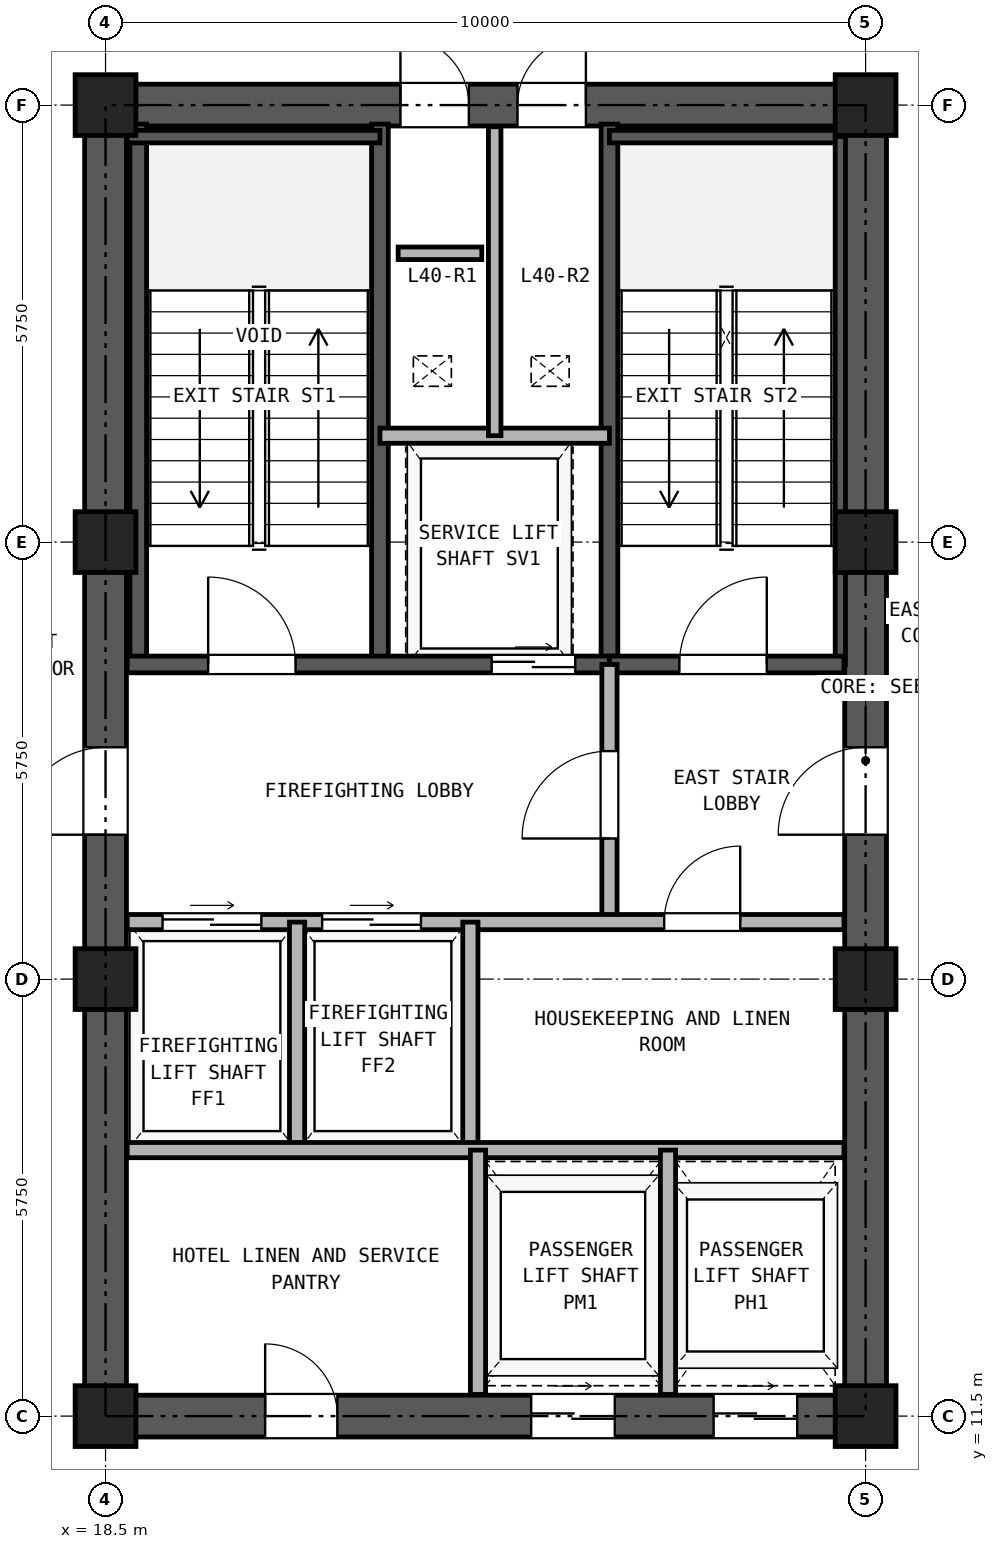
"""IFC4 building model, lengths in metres.
Left out: names, types, materials, properties, quantities, classifications, styles, units other than length and angle.
Written with IfcOpenShell. Run it as: python <this file> out.ifc"""

import sys

from ifc_helpers import new_model, si_unit, direction, frame, frame_2d, origin, origin_2d, place, context, subcontext, project, spatial, rectangle, hollow_rectangle, extrude, source, transform, mapped, element, fill, save


model = new_model("IFC4")
c1 = context("Model", 3, precision=1e-05, world=origin(), true_north=direction((0.0, 1.0)))
c2 = subcontext(c1, "Body", "Model", "MODEL_VIEW")
j1 = project(units=[si_unit("LENGTHUNIT", "METRE"), si_unit("PLANEANGLEUNIT", "RADIAN")], contexts=[c1])
p1 = place(None, origin())
s1 = spatial("IfcSite", under=j1, at=p1, CompositionType="ELEMENT")
p2 = place(p1, origin())
s2 = spatial("IfcBuilding", under=s1, at=p2, CompositionType="ELEMENT")
p3 = place(p2, frame((0.0, 0.0, 143.9)))
s3 = spatial("IfcBuildingStorey", under=s2, at=p3, CompositionType="ELEMENT", Elevation=143.9)
m1 = source(origin(), c2, "Body", "SweptSolid", [
    extrude(hollow_rectangle(XDim=0.8, YDim=0.8, WallThickness=0.045, at=origin_2d()), origin(), (0.0, 0.0, 1.0), 4.25),
])
for number, where, z_axis, x_axis in (
    (1, (18.5, 11.5, 0.0), (0.0, 0.0, 1.0), (1.0, 0.0, 0.0)),
    (2, (18.5, 17.25, 0.0), (0.0, 0.0, 1.0), (1.0, 0.0, 0.0)),
    (3, (18.5, 23.0, 0.0), (0.0, 0.0, 1.0), (1.0, 0.0, 0.0)),
    (4, (18.5, 28.75, 0.0), (0.0, 0.0, 1.0), (1.0, 0.0, 0.0)),
    (5, (28.5, 11.5, 0.0), (0.0, 0.0, 1.0), (1.0, 0.0, 0.0)),
    (6, (28.5, 17.25, 0.0), (0.0, 0.0, 1.0), (1.0, 0.0, 0.0)),
    (7, (28.5, 23.0, 0.0), (0.0, 0.0, 1.0), (1.0, 0.0, 0.0)),
    (8, (28.5, 28.75, 0.0), (0.0, 0.0, 1.0), (1.0, 0.0, 0.0)),
):
    element("IfcColumn", number, at=place(p3, frame(where, z_axis=z_axis, x_axis=x_axis)), inside=s3, PredefinedType="COLUMN", context=c2, shape_type="MappedRepresentation", body=[
        mapped(m1, transform((0.0, 0.0, 0.0), x_axis=(1.0, 0.0, 0.0), y_axis=(0.0, 1.0, 0.0), z_axis=(0.0, 0.0, 1.0), scale=1.0)),
    ])
p4 = place(p3, frame((18.225, 11.5, 0.0), z_axis=(0.0, 0.0, 1.0), x_axis=(1.0, 0.0, 0.0)))
e9 = element("IfcWall", 9, at=p4, inside=s3, PredefinedType="SHEAR", context=c2, shape_type="SweptSolid", body=[
    extrude(rectangle(XDim=10.55, YDim=0.55, at=frame_2d((5.275, 0.0))), origin(), (0.0, 0.0, 1.0), 4.25),
])
p5 = place(p4, frame((2.375, 0.0, 0.0)))
e10 = element("IfcOpeningElement", 10, at=p5, cuts=e9, PredefinedType="OPENING", context=c2, shape_type="SweptSolid", body=[
    extrude(rectangle(XDim=0.95, YDim=2.15, at=frame_2d((0.475, 1.075))), frame((0.0, 0.285, 0.0), z_axis=(0.0, -1.0, 0.0), x_axis=(1.0, 0.0, 0.0)), (0.0, 0.0, 1.0), 0.57),
])
p6 = place(p4, frame((5.875, 0.0, 0.0)))
e11 = element("IfcOpeningElement", 11, at=p6, cuts=e9, PredefinedType="OPENING", context=c2, shape_type="SweptSolid", body=[
    extrude(rectangle(XDim=1.1, YDim=2.25, at=frame_2d((0.55, 1.125))), frame((0.0, 0.285, 0.0), z_axis=(0.0, -1.0, 0.0), x_axis=(1.0, 0.0, 0.0)), (0.0, 0.0, 1.0), 0.57),
])
p7 = place(p4, frame((8.275, 0.0, 0.0)))
e12 = element("IfcOpeningElement", 12, at=p7, cuts=e9, PredefinedType="OPENING", context=c2, shape_type="SweptSolid", body=[
    extrude(rectangle(XDim=1.1, YDim=2.25, at=frame_2d((0.55, 1.125))), frame((0.0, 0.285, 0.0), z_axis=(0.0, -1.0, 0.0), x_axis=(1.0, 0.0, 0.0)), (0.0, 0.0, 1.0), 0.57),
])
p8 = place(p3, frame((18.225, 28.75, 0.0), z_axis=(0.0, 0.0, 1.0), x_axis=(1.0, 0.0, 0.0)))
e13 = element("IfcWall", 13, at=p8, inside=s3, PredefinedType="SHEAR", context=c2, shape_type="SweptSolid", body=[
    extrude(rectangle(XDim=10.55, YDim=0.55, at=frame_2d((5.275, 0.0))), origin(), (0.0, 0.0, 1.0), 4.25),
])
p9 = place(p8, frame((4.155, 0.0, 0.0)))
e14 = element("IfcOpeningElement", 14, at=p9, cuts=e13, PredefinedType="OPENING", context=c2, shape_type="SweptSolid", body=[
    extrude(rectangle(XDim=0.9, YDim=2.05, at=frame_2d((0.45, 1.025))), frame((0.0, 0.285, 0.0), z_axis=(0.0, -1.0, 0.0), x_axis=(1.0, 0.0, 0.0)), (0.0, 0.0, 1.0), 0.57),
])
p10 = place(p8, frame((5.695, 0.0, 0.0)))
e15 = element("IfcOpeningElement", 15, at=p10, cuts=e13, PredefinedType="OPENING", context=c2, shape_type="SweptSolid", body=[
    extrude(rectangle(XDim=0.9, YDim=2.05, at=frame_2d((0.45, 1.025))), frame((0.0, 0.285, 0.0), z_axis=(0.0, -1.0, 0.0), x_axis=(1.0, 0.0, 0.0)), (0.0, 0.0, 1.0), 0.57),
])
p11 = place(p3, frame((18.5, 11.775, 0.0), z_axis=(0.0, 0.0, 1.0), x_axis=(0.0, 1.0, 0.0)))
e16 = element("IfcWall", 16, at=p11, inside=s3, PredefinedType="SHEAR", context=c2, shape_type="SweptSolid", body=[
    extrude(rectangle(XDim=16.7, YDim=0.55, at=frame_2d((8.35, 0.0))), origin(), (0.0, 0.0, 1.0), 4.25),
])
p12 = place(p11, frame((7.375, 0.0, 0.0)))
e17 = element("IfcOpeningElement", 17, at=p12, cuts=e16, PredefinedType="OPENING", context=c2, shape_type="SweptSolid", body=[
    extrude(rectangle(XDim=1.15, YDim=2.2, at=frame_2d((0.575, 1.1))), frame((0.0, 0.285, 0.0), z_axis=(0.0, -1.0, 0.0), x_axis=(1.0, 0.0, 0.0)), (0.0, 0.0, 1.0), 0.57),
])
p13 = place(p3, frame((28.5, 11.775, 0.0), z_axis=(0.0, 0.0, 1.0), x_axis=(0.0, 1.0, 0.0)))
e18 = element("IfcWall", 18, at=p13, inside=s3, PredefinedType="SHEAR", context=c2, shape_type="SweptSolid", body=[
    extrude(rectangle(XDim=16.7, YDim=0.55, at=frame_2d((8.35, 0.0))), origin(), (0.0, 0.0, 1.0), 4.25),
])
p14 = place(p13, frame((7.375, 0.0, 0.0)))
e19 = element("IfcOpeningElement", 19, at=p14, cuts=e18, PredefinedType="OPENING", context=c2, shape_type="SweptSolid", body=[
    extrude(rectangle(XDim=1.15, YDim=2.2, at=frame_2d((0.575, 1.1))), frame((0.0, 0.285, 0.0), z_axis=(0.0, -1.0, 0.0), x_axis=(1.0, 0.0, 0.0)), (0.0, 0.0, 1.0), 0.57),
])
for number, where, z_axis, x_axis in (
    (20, (18.93, 21.39, 0.0), (0.0, 0.0, 1.0), (0.0, 1.0, 0.0)),
    (21, (22.11, 21.39, 0.0), (0.0, 0.0, 1.0), (0.0, 1.0, 0.0)),
    (22, (25.13, 21.39, 0.0), (0.0, 0.0, 1.0), (0.0, 1.0, 0.0)),
):
    element("IfcWall", number, at=place(p3, frame(where, z_axis=z_axis, x_axis=x_axis)), inside=s3, PredefinedType="SOLIDWALL", context=c2, shape_type="SweptSolid", body=[
        extrude(rectangle(XDim=7.11, YDim=0.22, at=frame_2d((3.555, 0.0))), origin(), (0.0, 0.0, 1.0), 4.25),
    ])
p15 = place(p3, frame((18.785, 28.335, 0.0), z_axis=(0.0, 0.0, 1.0), x_axis=(1.0, 0.0, 0.0)))
e23 = element("IfcWall", 23, at=p15, inside=s3, PredefinedType="PARTITIONING", context=c2, shape_type="SweptSolid", body=[
    extrude(rectangle(XDim=3.325, YDim=0.165, at=frame_2d((1.663, 0.0))), origin(), (0.0, 0.0, 1.0), 4.25),
])
p16 = place(p3, frame((25.13, 28.335, 0.0), z_axis=(0.0, 0.0, 1.0), x_axis=(1.0, 0.0, 0.0)))
e24 = element("IfcWall", 24, at=p16, inside=s3, PredefinedType="PARTITIONING", context=c2, shape_type="SweptSolid", body=[
    extrude(rectangle(XDim=3.085, YDim=0.165, at=frame_2d((1.542, 0.0))), origin(), (0.0, 0.0, 1.0), 4.25),
])
p17 = place(p3, frame((28.167, 21.39, 0.0), z_axis=(0.0, 0.0, 1.0), x_axis=(0.0, 1.0, 0.0)))
e25 = element("IfcWall", 25, at=p17, inside=s3, PredefinedType="PARTITIONING", context=c2, shape_type="SweptSolid", body=[
    extrude(rectangle(XDim=6.945, YDim=0.135, at=frame_2d((3.473, 0.0))), origin(), (0.0, 0.0, 1.0), 4.25),
])
p18 = place(p3, frame((18.785, 21.39, 0.0), z_axis=(0.0, 0.0, 1.0), x_axis=(1.0, 0.0, 0.0)))
e26 = element("IfcWall", 26, at=p18, inside=s3, PredefinedType="SOLIDWALL", context=c2, shape_type="SweptSolid", body=[
    extrude(rectangle(XDim=6.345, YDim=0.22, at=frame_2d((3.172, 0.0))), origin(), (0.0, 0.0, 1.0), 4.25),
])
p19 = place(p18, frame((1.065, 0.0, 0.0)))
e27 = element("IfcOpeningElement", 27, at=p19, cuts=e26, PredefinedType="OPENING", context=c2, shape_type="SweptSolid", body=[
    extrude(rectangle(XDim=1.15, YDim=2.2, at=frame_2d((0.575, 1.1))), frame((0.0, 0.12, 0.0), z_axis=(0.0, -1.0, 0.0), x_axis=(1.0, 0.0, 0.0)), (0.0, 0.0, 1.0), 0.24),
])
p20 = place(p18, frame((4.795, 0.0, 0.0)))
e28 = element("IfcOpeningElement", 28, at=p20, cuts=e26, PredefinedType="OPENING", context=c2, shape_type="SweptSolid", body=[
    extrude(rectangle(XDim=1.1, YDim=2.25, at=frame_2d((0.55, 1.125))), frame((0.0, 0.12, 0.0), z_axis=(0.0, -1.0, 0.0), x_axis=(1.0, 0.0, 0.0)), (0.0, 0.0, 1.0), 0.24),
])
p21 = place(p3, frame((25.13, 21.39, 0.0), z_axis=(0.0, 0.0, 1.0), x_axis=(1.0, 0.0, 0.0)))
e29 = element("IfcWall", 29, at=p21, inside=s3, PredefinedType="SOLIDWALL", context=c2, shape_type="SweptSolid", body=[
    extrude(rectangle(XDim=3.085, YDim=0.22, at=frame_2d((1.542, 0.0))), origin(), (0.0, 0.0, 1.0), 4.25),
])
p22 = place(p21, frame((0.92, 0.0, 0.0)))
e30 = element("IfcOpeningElement", 30, at=p22, cuts=e29, PredefinedType="OPENING", context=c2, shape_type="SweptSolid", body=[
    extrude(rectangle(XDim=1.15, YDim=2.2, at=frame_2d((0.575, 1.1))), frame((0.0, 0.12, 0.0), z_axis=(0.0, -1.0, 0.0), x_axis=(1.0, 0.0, 0.0)), (0.0, 0.0, 1.0), 0.24),
])
p23 = place(p3, frame((22.11, 24.4, 0.0), z_axis=(0.0, 0.0, 1.0), x_axis=(1.0, 0.0, 0.0)))
e31 = element("IfcWall", 31, at=p23, inside=s3, PredefinedType="PARTITIONING", context=c2, shape_type="SweptSolid", body=[
    extrude(rectangle(XDim=3.02, YDim=0.2, at=frame_2d((1.51, 0.0))), origin(), (0.0, 0.0, 1.0), 4.25),
])
p24 = place(p3, frame((23.62, 24.4, 0.0), z_axis=(0.0, 0.0, 1.0), x_axis=(0.0, 1.0, 0.0)))
e32 = element("IfcWall", 32, at=p24, inside=s3, PredefinedType="PARTITIONING", context=c2, shape_type="SweptSolid", body=[
    extrude(rectangle(XDim=4.065, YDim=0.165, at=frame_2d((2.033, 0.0))), origin(), (0.0, 0.0, 1.0), 4.25),
])
p25 = place(p3, frame((25.13, 18.0, 0.0), z_axis=(0.0, 0.0, 1.0), x_axis=(0.0, 1.0, 0.0)))
e33 = element("IfcWall", 33, at=p25, inside=s3, PredefinedType="PARTITIONING", context=c2, shape_type="SweptSolid", body=[
    extrude(rectangle(XDim=3.39, YDim=0.2, at=frame_2d((1.695, 0.0))), origin(), (0.0, 0.0, 1.0), 4.25),
])
p26 = place(p25, frame((1.1, 0.0, 0.0)))
e34 = element("IfcOpeningElement", 34, at=p26, cuts=e33, PredefinedType="OPENING", context=c2, shape_type="SweptSolid", body=[
    extrude(rectangle(XDim=1.15, YDim=2.2, at=frame_2d((0.575, 1.1))), frame((0.0, 0.11, 0.0), z_axis=(0.0, -1.0, 0.0), x_axis=(1.0, 0.0, 0.0)), (0.0, 0.0, 1.0), 0.22),
])
p27 = place(p3, frame((18.785, 18.0, 0.0), z_axis=(0.0, 0.0, 1.0), x_axis=(1.0, 0.0, 0.0)))
e35 = element("IfcWall", 35, at=p27, inside=s3, PredefinedType="PARTITIONING", context=c2, shape_type="SweptSolid", body=[
    extrude(rectangle(XDim=9.43, YDim=0.2, at=frame_2d((4.715, 0.0))), origin(), (0.0, 0.0, 1.0), 4.25),
])
p28 = place(p27, frame((0.465, 0.0, 0.0)))
e36 = element("IfcOpeningElement", 36, at=p28, cuts=e35, PredefinedType="OPENING", context=c2, shape_type="SweptSolid", body=[
    extrude(rectangle(XDim=1.3, YDim=2.3, at=frame_2d((0.65, 1.15))), frame((0.0, 0.11, 0.0), z_axis=(0.0, -1.0, 0.0), x_axis=(1.0, 0.0, 0.0)), (0.0, 0.0, 1.0), 0.22),
])
p29 = place(p27, frame((2.565, 0.0, 0.0)))
e37 = element("IfcOpeningElement", 37, at=p29, cuts=e35, PredefinedType="OPENING", context=c2, shape_type="SweptSolid", body=[
    extrude(rectangle(XDim=1.3, YDim=2.3, at=frame_2d((0.65, 1.15))), frame((0.0, 0.11, 0.0), z_axis=(0.0, -1.0, 0.0), x_axis=(1.0, 0.0, 0.0)), (0.0, 0.0, 1.0), 0.22),
])
p30 = place(p27, frame((7.065, 0.0, 0.0)))
e38 = element("IfcOpeningElement", 38, at=p30, cuts=e35, PredefinedType="OPENING", context=c2, shape_type="SweptSolid", body=[
    extrude(rectangle(XDim=1.0, YDim=2.15, at=frame_2d((0.5, 1.075))), frame((0.0, 0.11, 0.0), z_axis=(0.0, -1.0, 0.0), x_axis=(1.0, 0.0, 0.0)), (0.0, 0.0, 1.0), 0.22),
])
for number, where, z_axis, x_axis in (
    (39, (21.02, 15.0, 0.0), (0.0, 0.0, 1.0), (0.0, 1.0, 0.0)),
    (40, (23.3, 15.0, 0.0), (0.0, 0.0, 1.0), (0.0, 1.0, 0.0)),
):
    element("IfcWall", number, at=place(p3, frame(where, z_axis=z_axis, x_axis=x_axis)), inside=s3, PredefinedType="PARTITIONING", context=c2, shape_type="SweptSolid", body=[
        extrude(rectangle(XDim=3.0, YDim=0.2, at=frame_2d((1.5, 0.0))), origin(), (0.0, 0.0, 1.0), 4.25),
    ])
p31 = place(p3, frame((18.785, 15.0, 0.0), z_axis=(0.0, 0.0, 1.0), x_axis=(1.0, 0.0, 0.0)))
e41 = element("IfcWall", 41, at=p31, inside=s3, PredefinedType="PARTITIONING", context=c2, shape_type="SweptSolid", body=[
    extrude(rectangle(XDim=9.43, YDim=0.2, at=frame_2d((4.715, 0.0))), origin(), (0.0, 0.0, 1.0), 4.25),
])
for number, where, z_axis, x_axis in (
    (42, (23.4, 11.785, 0.0), (0.0, 0.0, 1.0), (0.0, 1.0, 0.0)),
    (43, (25.9, 11.785, 0.0), (0.0, 0.0, 1.0), (0.0, 1.0, 0.0)),
):
    element("IfcWall", number, at=place(p3, frame(where, z_axis=z_axis, x_axis=x_axis)), inside=s3, PredefinedType="PARTITIONING", context=c2, shape_type="SweptSolid", body=[
        extrude(rectangle(XDim=3.215, YDim=0.2, at=frame_2d((1.607, 0.0))), origin(), (0.0, 0.0, 1.0), 4.25),
    ])
p32 = place(p3, frame((22.35, 26.8, 0.0), z_axis=(0.0, 0.0, 1.0), x_axis=(1.0, 0.0, 0.0)))
e44 = element("IfcWall", 44, at=p32, inside=s3, PredefinedType="PARTITIONING", context=c2, shape_type="SweptSolid", body=[
    extrude(rectangle(XDim=1.1, YDim=0.165, at=frame_2d((0.55, 0.0))), origin(), (0.0, 0.0, 1.0), 4.25),
])
p33 = place(p19, frame((1.15, 0.0, 0.0), z_axis=(0.0, 0.0, 1.0), x_axis=(-1.0, 0.0, 0.0)))
e45 = element("IfcDoor", 45, at=p33, inside=s3, OperationType="SINGLE_SWING_LEFT", PredefinedType="DOOR", context=c2, shape_type="SweptSolid", body=[
    extrude(rectangle(XDim=1.15, YDim=2.2, at=frame_2d((0.575, 1.1))), frame((0.0, 0.025, 0.0), z_axis=(0.0, -1.0, 0.0), x_axis=(1.0, 0.0, 0.0)), (0.0, 0.0, 1.0), 0.05),
])
fill(e27, e45)
p34 = place(p22, frame((1.15, 0.0, 0.0), z_axis=(0.0, 0.0, 1.0), x_axis=(-1.0, 0.0, 0.0)))
e46 = element("IfcDoor", 46, at=p34, inside=s3, OperationType="SINGLE_SWING_RIGHT", PredefinedType="DOOR", context=c2, shape_type="SweptSolid", body=[
    extrude(rectangle(XDim=1.15, YDim=2.2, at=frame_2d((0.575, 1.1))), frame((0.0, 0.025, 0.0), z_axis=(0.0, -1.0, 0.0), x_axis=(1.0, 0.0, 0.0)), (0.0, 0.0, 1.0), 0.05),
])
fill(e30, e46)
p35 = place(p20, frame((1.1, 0.0, 0.0), z_axis=(0.0, 0.0, 1.0), x_axis=(-1.0, 0.0, 0.0)))
e47 = element("IfcDoor", 47, at=p35, inside=s3, OperationType="DOUBLE_DOOR_SLIDING", PredefinedType="DOOR", context=c2, shape_type="SweptSolid", body=[
    extrude(rectangle(XDim=1.1, YDim=2.25, at=frame_2d((0.55, 1.125))), frame((0.0, 0.025, 0.0), z_axis=(0.0, -1.0, 0.0), x_axis=(1.0, 0.0, 0.0)), (0.0, 0.0, 1.0), 0.05),
])
fill(e28, e47)
p36 = place(p26, origin())
e48 = element("IfcDoor", 48, at=p36, inside=s3, OperationType="SINGLE_SWING_LEFT", PredefinedType="DOOR", context=c2, shape_type="SweptSolid", body=[
    extrude(rectangle(XDim=1.15, YDim=2.2, at=frame_2d((0.575, 1.1))), frame((0.0, 0.025, 0.0), z_axis=(0.0, -1.0, 0.0), x_axis=(1.0, 0.0, 0.0)), (0.0, 0.0, 1.0), 0.05),
])
fill(e34, e48)
p37 = place(p28, origin())
e49 = element("IfcDoor", 49, at=p37, inside=s3, OperationType="DOUBLE_DOOR_SLIDING", PredefinedType="DOOR", context=c2, shape_type="SweptSolid", body=[
    extrude(rectangle(XDim=1.3, YDim=2.3, at=frame_2d((0.65, 1.15))), frame((0.0, 0.025, 0.0), z_axis=(0.0, -1.0, 0.0), x_axis=(1.0, 0.0, 0.0)), (0.0, 0.0, 1.0), 0.05),
])
fill(e36, e49)
p38 = place(p29, origin())
e50 = element("IfcDoor", 50, at=p38, inside=s3, OperationType="DOUBLE_DOOR_SLIDING", PredefinedType="DOOR", context=c2, shape_type="SweptSolid", body=[
    extrude(rectangle(XDim=1.3, YDim=2.3, at=frame_2d((0.65, 1.15))), frame((0.0, 0.025, 0.0), z_axis=(0.0, -1.0, 0.0), x_axis=(1.0, 0.0, 0.0)), (0.0, 0.0, 1.0), 0.05),
])
fill(e37, e50)
p39 = place(p30, frame((1.0, 0.0, 0.0), z_axis=(0.0, 0.0, 1.0), x_axis=(-1.0, 0.0, 0.0)))
e51 = element("IfcDoor", 51, at=p39, inside=s3, OperationType="SINGLE_SWING_RIGHT", PredefinedType="DOOR", context=c2, shape_type="SweptSolid", body=[
    extrude(rectangle(XDim=1.0, YDim=2.15, at=frame_2d((0.5, 1.075))), frame((0.0, 0.025, 0.0), z_axis=(0.0, -1.0, 0.0), x_axis=(1.0, 0.0, 0.0)), (0.0, 0.0, 1.0), 0.05),
])
fill(e38, e51)
p40 = place(p12, frame((1.15, 0.0, 0.0), z_axis=(0.0, 0.0, 1.0), x_axis=(-1.0, 0.0, 0.0)))
e52 = element("IfcDoor", 52, at=p40, inside=s3, OperationType="SINGLE_SWING_LEFT", PredefinedType="DOOR", context=c2, shape_type="SweptSolid", body=[
    extrude(rectangle(XDim=1.15, YDim=2.2, at=frame_2d((0.575, 1.1))), frame((0.0, 0.025, 0.0), z_axis=(0.0, -1.0, 0.0), x_axis=(1.0, 0.0, 0.0)), (0.0, 0.0, 1.0), 0.05),
])
fill(e17, e52)
p41 = place(p14, origin())
e53 = element("IfcDoor", 53, at=p41, inside=s3, OperationType="SINGLE_SWING_LEFT", PredefinedType="DOOR", context=c2, shape_type="SweptSolid", body=[
    extrude(rectangle(XDim=1.15, YDim=2.2, at=frame_2d((0.575, 1.1))), frame((0.0, 0.025, 0.0), z_axis=(0.0, -1.0, 0.0), x_axis=(1.0, 0.0, 0.0)), (0.0, 0.0, 1.0), 0.05),
])
fill(e19, e53)
p42 = place(p9, origin())
e54 = element("IfcDoor", 54, at=p42, inside=s3, OperationType="SINGLE_SWING_LEFT", PredefinedType="DOOR", context=c2, shape_type="SweptSolid", body=[
    extrude(rectangle(XDim=0.9, YDim=2.05, at=frame_2d((0.45, 1.025))), frame((0.0, 0.025, 0.0), z_axis=(0.0, -1.0, 0.0), x_axis=(1.0, 0.0, 0.0)), (0.0, 0.0, 1.0), 0.05),
])
fill(e14, e54)
p43 = place(p10, origin())
e55 = element("IfcDoor", 55, at=p43, inside=s3, OperationType="SINGLE_SWING_RIGHT", PredefinedType="DOOR", context=c2, shape_type="SweptSolid", body=[
    extrude(rectangle(XDim=0.9, YDim=2.05, at=frame_2d((0.45, 1.025))), frame((0.0, 0.025, 0.0), z_axis=(0.0, -1.0, 0.0), x_axis=(1.0, 0.0, 0.0)), (0.0, 0.0, 1.0), 0.05),
])
fill(e15, e55)
p44 = place(p5, frame((0.95, 0.0, 0.0), z_axis=(0.0, 0.0, 1.0), x_axis=(-1.0, 0.0, 0.0)))
e56 = element("IfcDoor", 56, at=p44, inside=s3, OperationType="SINGLE_SWING_LEFT", PredefinedType="DOOR", context=c2, shape_type="SweptSolid", body=[
    extrude(rectangle(XDim=0.95, YDim=2.15, at=frame_2d((0.475, 1.075))), frame((0.0, 0.025, 0.0), z_axis=(0.0, -1.0, 0.0), x_axis=(1.0, 0.0, 0.0)), (0.0, 0.0, 1.0), 0.05),
])
fill(e10, e56)
p45 = place(p6, frame((1.1, 0.0, 0.0), z_axis=(0.0, 0.0, 1.0), x_axis=(-1.0, 0.0, 0.0)))
e57 = element("IfcDoor", 57, at=p45, inside=s3, OperationType="DOUBLE_DOOR_SLIDING", PredefinedType="DOOR", context=c2, shape_type="SweptSolid", body=[
    extrude(rectangle(XDim=1.1, YDim=2.25, at=frame_2d((0.55, 1.125))), frame((0.0, 0.025, 0.0), z_axis=(0.0, -1.0, 0.0), x_axis=(1.0, 0.0, 0.0)), (0.0, 0.0, 1.0), 0.05),
])
fill(e11, e57)
p46 = place(p7, frame((1.1, 0.0, 0.0), z_axis=(0.0, 0.0, 1.0), x_axis=(-1.0, 0.0, 0.0)))
e58 = element("IfcDoor", 58, at=p46, inside=s3, OperationType="DOUBLE_DOOR_SLIDING", PredefinedType="DOOR", context=c2, shape_type="SweptSolid", body=[
    extrude(rectangle(XDim=1.1, YDim=2.25, at=frame_2d((0.55, 1.125))), frame((0.0, 0.025, 0.0), z_axis=(0.0, -1.0, 0.0), x_axis=(1.0, 0.0, 0.0)), (0.0, 0.0, 1.0), 0.05),
])
fill(e12, e58)
save(model, sys.argv[1])
